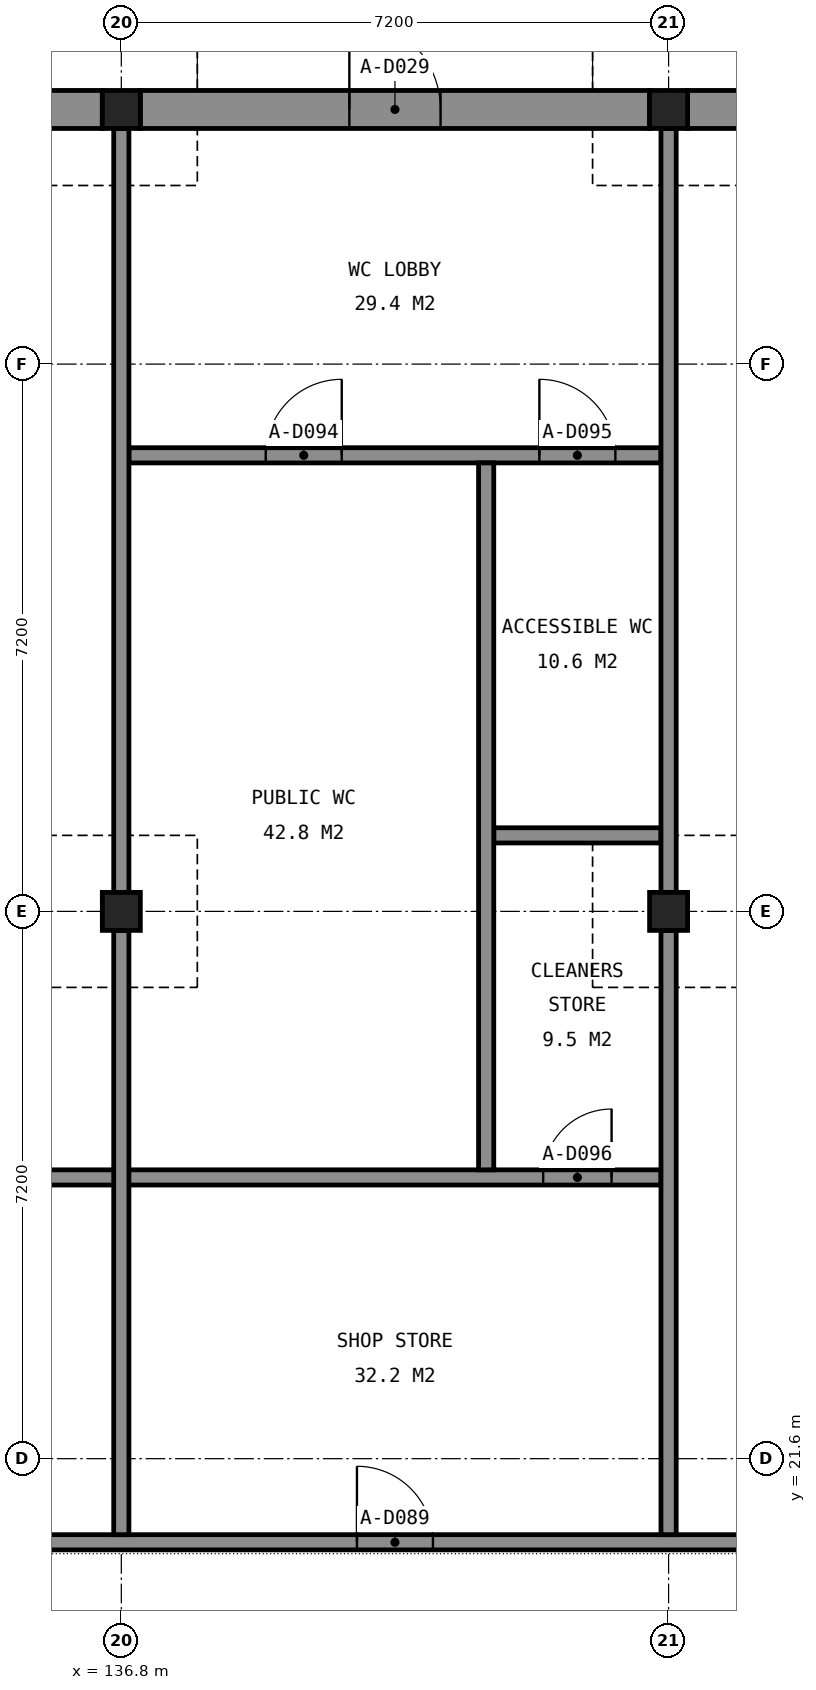
"""IFC4 building model, lengths in metres.
Left out: names, types, materials, properties, quantities, classifications, styles, units other than length and angle.
Written with IfcOpenShell. Run it as: python <this file> out.ifc"""

import sys

from ifc_helpers import new_model, si_unit, direction, frame, frame_2d, origin, origin_2d, place, context, subcontext, project, spatial, rectangle, extrude, element, fill, save


model = new_model("IFC4")
c1 = context("Model", 3, precision=1e-05, world=origin(), true_north=direction((0.0, 1.0)))
c2 = subcontext(c1, "Body", "Model", "MODEL_VIEW")
j1 = project(units=[si_unit("LENGTHUNIT", "METRE"), si_unit("PLANEANGLEUNIT", "RADIAN")], contexts=[c1])
p1 = place(None, origin())
s1 = spatial("IfcSite", under=j1, at=p1, CompositionType="ELEMENT")
p2 = place(p1, origin())
s2 = spatial("IfcBuilding", under=s1, at=p2, CompositionType="ELEMENT")
p3 = place(p2, origin())
s3 = spatial("IfcBuildingStorey", under=s2, at=p3, CompositionType="ELEMENT", Elevation=0.0)
for number, where, z_axis, x_axis in (
    (1, (136.8, 39.35, 0.0), (0.0, 0.0, 1.0), (1.0, 0.0, 0.0)),
    (2, (144.0, 39.35, 0.0), (0.0, 0.0, 1.0), (1.0, 0.0, 0.0)),
    (3, (136.8, 28.8, 0.0), (0.0, 0.0, 1.0), (1.0, 0.0, 0.0)),
    (4, (144.0, 28.8, 0.0), (0.0, 0.0, 1.0), (1.0, 0.0, 0.0)),
):
    element("IfcColumn", number, at=place(p3, frame(where, z_axis=z_axis, x_axis=x_axis)), inside=s3, PredefinedType="COLUMN", context=c2, shape_type="SweptSolid", body=[
        extrude(rectangle(XDim=0.5, YDim=0.5, at=origin_2d()), origin(), (0.0, 0.0, 1.0), 3.7),
    ])
p4 = place(p3, frame((129.85, 39.35, 0.0), z_axis=(0.0, 0.0, 1.0), x_axis=(1.0, 0.0, 0.0)))
e5 = element("IfcWall", 5, at=p4, inside=s3, PredefinedType="SOLIDWALL", context=c2, shape_type="SweptSolid", body=[
    extrude(rectangle(XDim=6.7, YDim=0.5, at=frame_2d((3.35, 0.0))), origin(), (0.0, 0.0, 1.0), 3.6),
])
p5 = place(p4, frame((0.45, 0.0, 0.0)))
e6 = element("IfcOpeningElement", 6, at=p5, cuts=e5, PredefinedType="OPENING", context=c2, shape_type="SweptSolid", body=[
    extrude(rectangle(XDim=1.8, YDim=2.4, at=frame_2d((0.9, 1.2))), frame((0.0, 0.26, 0.0), z_axis=(0.0, -1.0, 0.0), x_axis=(1.0, 0.0, 0.0)), (0.0, 0.0, 1.0), 0.52),
])
p6 = place(p4, frame((2.6, 0.0, 0.6)))
e7 = element("IfcOpeningElement", 7, at=p6, cuts=e5, PredefinedType="OPENING", context=c2, shape_type="SweptSolid", body=[
    extrude(rectangle(XDim=3.0, YDim=2.4, at=frame_2d((1.5, 1.2))), frame((0.0, 0.26, 0.0), z_axis=(0.0, -1.0, 0.0), x_axis=(1.0, 0.0, 0.0)), (0.0, 0.0, 1.0), 0.52),
])
p7 = place(p3, frame((137.05, 39.35, 0.0), z_axis=(0.0, 0.0, 1.0), x_axis=(1.0, 0.0, 0.0)))
e8 = element("IfcWall", 8, at=p7, inside=s3, PredefinedType="SOLIDWALL", context=c2, shape_type="SweptSolid", body=[
    extrude(rectangle(XDim=6.7, YDim=0.5, at=frame_2d((3.35, 0.0))), origin(), (0.0, 0.0, 1.0), 3.6),
])
p8 = place(p7, frame((2.75, 0.0, 0.0)))
e9 = element("IfcOpeningElement", 9, at=p8, cuts=e8, PredefinedType="OPENING", context=c2, shape_type="SweptSolid", body=[
    extrude(rectangle(XDim=1.2, YDim=2.1, at=frame_2d((0.6, 1.05))), frame((0.0, 0.26, 0.0), z_axis=(0.0, -1.0, 0.0), x_axis=(1.0, 0.0, 0.0)), (0.0, 0.0, 1.0), 0.52),
])
p9 = place(p3, frame((144.25, 39.35, 0.0), z_axis=(0.0, 0.0, 1.0), x_axis=(1.0, 0.0, 0.0)))
e10 = element("IfcWall", 10, at=p9, inside=s3, PredefinedType="SOLIDWALL", context=c2, shape_type="SweptSolid", body=[
    extrude(rectangle(XDim=6.45, YDim=0.5, at=frame_2d((3.225, 0.0))), origin(), (0.0, 0.0, 1.0), 3.6),
])
p10 = place(p9, frame((4.45, 0.0, 0.0)))
e11 = element("IfcOpeningElement", 11, at=p10, cuts=e10, PredefinedType="OPENING", context=c2, shape_type="SweptSolid", body=[
    extrude(rectangle(XDim=1.2, YDim=2.1, at=frame_2d((0.6, 1.05))), frame((0.0, 0.26, 0.0), z_axis=(0.0, -1.0, 0.0), x_axis=(1.0, 0.0, 0.0)), (0.0, 0.0, 1.0), 0.52),
])
p11 = place(p3, frame((54.35, 20.5, 0.0), z_axis=(0.0, 0.0, 1.0), x_axis=(1.0, 0.0, 0.0)))
e12 = element("IfcWall", 12, at=p11, inside=s3, PredefinedType="PARTITIONING", context=c2, shape_type="SweptSolid", body=[
    extrude(rectangle(XDim=92.9, YDim=0.2, at=frame_2d((46.45, 0.0))), origin(), (0.0, 0.0, 1.0), 3.5),
])
p12 = place(p11, frame((1.1, 0.0, 0.0)))
e13 = element("IfcOpeningElement", 13, at=p12, cuts=e12, PredefinedType="OPENING", context=c2, shape_type="SweptSolid", body=[
    extrude(rectangle(XDim=0.9, YDim=2.1, at=frame_2d((0.45, 1.05))), frame((0.0, 0.11, 0.0), z_axis=(0.0, -1.0, 0.0), x_axis=(1.0, 0.0, 0.0)), (0.0, 0.0, 1.0), 0.22),
])
p13 = place(p11, frame((90.9, 0.0, 0.0)))
e14 = element("IfcOpeningElement", 14, at=p13, cuts=e12, PredefinedType="OPENING", context=c2, shape_type="SweptSolid", body=[
    extrude(rectangle(XDim=0.9, YDim=2.1, at=frame_2d((0.45, 1.05))), frame((0.0, 0.11, 0.0), z_axis=(0.0, -1.0, 0.0), x_axis=(1.0, 0.0, 0.0)), (0.0, 0.0, 1.0), 0.22),
])
p14 = place(p11, frame((6.35, 0.0, 0.0)))
e15 = element("IfcOpeningElement", 15, at=p14, cuts=e12, PredefinedType="OPENING", context=c2, shape_type="SweptSolid", body=[
    extrude(rectangle(XDim=1.0, YDim=2.1, at=frame_2d((0.5, 1.05))), frame((0.0, 0.11, 0.0), z_axis=(0.0, -1.0, 0.0), x_axis=(1.0, 0.0, 0.0)), (0.0, 0.0, 1.0), 0.22),
])
p15 = place(p11, frame((13.55, 0.0, 0.0)))
e16 = element("IfcOpeningElement", 16, at=p15, cuts=e12, PredefinedType="OPENING", context=c2, shape_type="SweptSolid", body=[
    extrude(rectangle(XDim=1.0, YDim=2.1, at=frame_2d((0.5, 1.05))), frame((0.0, 0.11, 0.0), z_axis=(0.0, -1.0, 0.0), x_axis=(1.0, 0.0, 0.0)), (0.0, 0.0, 1.0), 0.22),
])
p16 = place(p11, frame((20.75, 0.0, 0.0)))
e17 = element("IfcOpeningElement", 17, at=p16, cuts=e12, PredefinedType="OPENING", context=c2, shape_type="SweptSolid", body=[
    extrude(rectangle(XDim=1.0, YDim=2.1, at=frame_2d((0.5, 1.05))), frame((0.0, 0.11, 0.0), z_axis=(0.0, -1.0, 0.0), x_axis=(1.0, 0.0, 0.0)), (0.0, 0.0, 1.0), 0.22),
])
p17 = place(p11, frame((27.95, 0.0, 0.0)))
e18 = element("IfcOpeningElement", 18, at=p17, cuts=e12, PredefinedType="OPENING", context=c2, shape_type="SweptSolid", body=[
    extrude(rectangle(XDim=1.0, YDim=2.1, at=frame_2d((0.5, 1.05))), frame((0.0, 0.11, 0.0), z_axis=(0.0, -1.0, 0.0), x_axis=(1.0, 0.0, 0.0)), (0.0, 0.0, 1.0), 0.22),
])
p18 = place(p11, frame((35.15, 0.0, 0.0)))
e19 = element("IfcOpeningElement", 19, at=p18, cuts=e12, PredefinedType="OPENING", context=c2, shape_type="SweptSolid", body=[
    extrude(rectangle(XDim=1.0, YDim=2.1, at=frame_2d((0.5, 1.05))), frame((0.0, 0.11, 0.0), z_axis=(0.0, -1.0, 0.0), x_axis=(1.0, 0.0, 0.0)), (0.0, 0.0, 1.0), 0.22),
])
p19 = place(p11, frame((42.35, 0.0, 0.0)))
e20 = element("IfcOpeningElement", 20, at=p19, cuts=e12, PredefinedType="OPENING", context=c2, shape_type="SweptSolid", body=[
    extrude(rectangle(XDim=1.0, YDim=2.1, at=frame_2d((0.5, 1.05))), frame((0.0, 0.11, 0.0), z_axis=(0.0, -1.0, 0.0), x_axis=(1.0, 0.0, 0.0)), (0.0, 0.0, 1.0), 0.22),
])
p20 = place(p11, frame((49.55, 0.0, 0.0)))
e21 = element("IfcOpeningElement", 21, at=p20, cuts=e12, PredefinedType="OPENING", context=c2, shape_type="SweptSolid", body=[
    extrude(rectangle(XDim=1.0, YDim=2.1, at=frame_2d((0.5, 1.05))), frame((0.0, 0.11, 0.0), z_axis=(0.0, -1.0, 0.0), x_axis=(1.0, 0.0, 0.0)), (0.0, 0.0, 1.0), 0.22),
])
p21 = place(p11, frame((56.75, 0.0, 0.0)))
e22 = element("IfcOpeningElement", 22, at=p21, cuts=e12, PredefinedType="OPENING", context=c2, shape_type="SweptSolid", body=[
    extrude(rectangle(XDim=1.0, YDim=2.1, at=frame_2d((0.5, 1.05))), frame((0.0, 0.11, 0.0), z_axis=(0.0, -1.0, 0.0), x_axis=(1.0, 0.0, 0.0)), (0.0, 0.0, 1.0), 0.22),
])
p22 = place(p11, frame((63.95, 0.0, 0.0)))
e23 = element("IfcOpeningElement", 23, at=p22, cuts=e12, PredefinedType="OPENING", context=c2, shape_type="SweptSolid", body=[
    extrude(rectangle(XDim=1.0, YDim=2.1, at=frame_2d((0.5, 1.05))), frame((0.0, 0.11, 0.0), z_axis=(0.0, -1.0, 0.0), x_axis=(1.0, 0.0, 0.0)), (0.0, 0.0, 1.0), 0.22),
])
p23 = place(p11, frame((71.15, 0.0, 0.0)))
e24 = element("IfcOpeningElement", 24, at=p23, cuts=e12, PredefinedType="OPENING", context=c2, shape_type="SweptSolid", body=[
    extrude(rectangle(XDim=1.0, YDim=2.1, at=frame_2d((0.5, 1.05))), frame((0.0, 0.11, 0.0), z_axis=(0.0, -1.0, 0.0), x_axis=(1.0, 0.0, 0.0)), (0.0, 0.0, 1.0), 0.22),
])
p24 = place(p11, frame((78.35, 0.0, 0.0)))
e25 = element("IfcOpeningElement", 25, at=p24, cuts=e12, PredefinedType="OPENING", context=c2, shape_type="SweptSolid", body=[
    extrude(rectangle(XDim=1.0, YDim=2.1, at=frame_2d((0.5, 1.05))), frame((0.0, 0.11, 0.0), z_axis=(0.0, -1.0, 0.0), x_axis=(1.0, 0.0, 0.0)), (0.0, 0.0, 1.0), 0.22),
])
p25 = place(p11, frame((85.55, 0.0, 0.0)))
e26 = element("IfcOpeningElement", 26, at=p25, cuts=e12, PredefinedType="OPENING", context=c2, shape_type="SweptSolid", body=[
    extrude(rectangle(XDim=1.0, YDim=2.1, at=frame_2d((0.5, 1.05))), frame((0.0, 0.11, 0.0), z_axis=(0.0, -1.0, 0.0), x_axis=(1.0, 0.0, 0.0)), (0.0, 0.0, 1.0), 0.22),
])
p26 = place(p3, frame((57.7, 25.3, 0.0), z_axis=(0.0, 0.0, 1.0), x_axis=(1.0, 0.0, 0.0)))
e27 = element("IfcWall", 27, at=p26, inside=s3, PredefinedType="PARTITIONING", context=c2, shape_type="SweptSolid", body=[
    extrude(rectangle(XDim=86.2, YDim=0.2, at=frame_2d((43.1, 0.0))), origin(), (0.0, 0.0, 1.0), 3.5),
])
p27 = place(p26, frame((3.0, 0.0, 0.0)))
e28 = element("IfcOpeningElement", 28, at=p27, cuts=e27, PredefinedType="OPENING", context=c2, shape_type="SweptSolid", body=[
    extrude(rectangle(XDim=1.0, YDim=2.1, at=frame_2d((0.5, 1.05))), frame((0.0, 0.11, 0.0), z_axis=(0.0, -1.0, 0.0), x_axis=(1.0, 0.0, 0.0)), (0.0, 0.0, 1.0), 0.22),
])
p28 = place(p26, frame((10.2, 0.0, 0.0)))
e29 = element("IfcOpeningElement", 29, at=p28, cuts=e27, PredefinedType="OPENING", context=c2, shape_type="SweptSolid", body=[
    extrude(rectangle(XDim=1.0, YDim=2.1, at=frame_2d((0.5, 1.05))), frame((0.0, 0.11, 0.0), z_axis=(0.0, -1.0, 0.0), x_axis=(1.0, 0.0, 0.0)), (0.0, 0.0, 1.0), 0.22),
])
p29 = place(p26, frame((17.4, 0.0, 0.0)))
e30 = element("IfcOpeningElement", 30, at=p29, cuts=e27, PredefinedType="OPENING", context=c2, shape_type="SweptSolid", body=[
    extrude(rectangle(XDim=1.0, YDim=2.1, at=frame_2d((0.5, 1.05))), frame((0.0, 0.11, 0.0), z_axis=(0.0, -1.0, 0.0), x_axis=(1.0, 0.0, 0.0)), (0.0, 0.0, 1.0), 0.22),
])
p30 = place(p26, frame((24.6, 0.0, 0.0)))
e31 = element("IfcOpeningElement", 31, at=p30, cuts=e27, PredefinedType="OPENING", context=c2, shape_type="SweptSolid", body=[
    extrude(rectangle(XDim=1.0, YDim=2.1, at=frame_2d((0.5, 1.05))), frame((0.0, 0.11, 0.0), z_axis=(0.0, -1.0, 0.0), x_axis=(1.0, 0.0, 0.0)), (0.0, 0.0, 1.0), 0.22),
])
p31 = place(p26, frame((31.8, 0.0, 0.0)))
e32 = element("IfcOpeningElement", 32, at=p31, cuts=e27, PredefinedType="OPENING", context=c2, shape_type="SweptSolid", body=[
    extrude(rectangle(XDim=1.0, YDim=2.1, at=frame_2d((0.5, 1.05))), frame((0.0, 0.11, 0.0), z_axis=(0.0, -1.0, 0.0), x_axis=(1.0, 0.0, 0.0)), (0.0, 0.0, 1.0), 0.22),
])
p32 = place(p26, frame((39.0, 0.0, 0.0)))
e33 = element("IfcOpeningElement", 33, at=p32, cuts=e27, PredefinedType="OPENING", context=c2, shape_type="SweptSolid", body=[
    extrude(rectangle(XDim=1.0, YDim=2.1, at=frame_2d((0.5, 1.05))), frame((0.0, 0.11, 0.0), z_axis=(0.0, -1.0, 0.0), x_axis=(1.0, 0.0, 0.0)), (0.0, 0.0, 1.0), 0.22),
])
p33 = place(p26, frame((46.2, 0.0, 0.0)))
e34 = element("IfcOpeningElement", 34, at=p33, cuts=e27, PredefinedType="OPENING", context=c2, shape_type="SweptSolid", body=[
    extrude(rectangle(XDim=1.0, YDim=2.1, at=frame_2d((0.5, 1.05))), frame((0.0, 0.11, 0.0), z_axis=(0.0, -1.0, 0.0), x_axis=(1.0, 0.0, 0.0)), (0.0, 0.0, 1.0), 0.22),
])
p34 = place(p26, frame((53.4, 0.0, 0.0)))
e35 = element("IfcOpeningElement", 35, at=p34, cuts=e27, PredefinedType="OPENING", context=c2, shape_type="SweptSolid", body=[
    extrude(rectangle(XDim=1.0, YDim=2.1, at=frame_2d((0.5, 1.05))), frame((0.0, 0.11, 0.0), z_axis=(0.0, -1.0, 0.0), x_axis=(1.0, 0.0, 0.0)), (0.0, 0.0, 1.0), 0.22),
])
p35 = place(p26, frame((60.6, 0.0, 0.0)))
e36 = element("IfcOpeningElement", 36, at=p35, cuts=e27, PredefinedType="OPENING", context=c2, shape_type="SweptSolid", body=[
    extrude(rectangle(XDim=1.0, YDim=2.1, at=frame_2d((0.5, 1.05))), frame((0.0, 0.11, 0.0), z_axis=(0.0, -1.0, 0.0), x_axis=(1.0, 0.0, 0.0)), (0.0, 0.0, 1.0), 0.22),
])
p36 = place(p26, frame((67.8, 0.0, 0.0)))
e37 = element("IfcOpeningElement", 37, at=p36, cuts=e27, PredefinedType="OPENING", context=c2, shape_type="SweptSolid", body=[
    extrude(rectangle(XDim=1.0, YDim=2.1, at=frame_2d((0.5, 1.05))), frame((0.0, 0.11, 0.0), z_axis=(0.0, -1.0, 0.0), x_axis=(1.0, 0.0, 0.0)), (0.0, 0.0, 1.0), 0.22),
])
p37 = place(p26, frame((75.0, 0.0, 0.0)))
e38 = element("IfcOpeningElement", 38, at=p37, cuts=e27, PredefinedType="OPENING", context=c2, shape_type="SweptSolid", body=[
    extrude(rectangle(XDim=1.0, YDim=2.1, at=frame_2d((0.5, 1.05))), frame((0.0, 0.11, 0.0), z_axis=(0.0, -1.0, 0.0), x_axis=(1.0, 0.0, 0.0)), (0.0, 0.0, 1.0), 0.22),
])
p38 = place(p26, frame((84.65, 0.0, 0.0)))
e39 = element("IfcOpeningElement", 39, at=p38, cuts=e27, PredefinedType="OPENING", context=c2, shape_type="SweptSolid", body=[
    extrude(rectangle(XDim=0.9, YDim=2.1, at=frame_2d((0.45, 1.05))), frame((0.0, 0.11, 0.0), z_axis=(0.0, -1.0, 0.0), x_axis=(1.0, 0.0, 0.0)), (0.0, 0.0, 1.0), 0.22),
])
p39 = place(p3, frame((141.7, 29.8, 0.0), z_axis=(0.0, 0.0, 1.0), x_axis=(1.0, 0.0, 0.0)))
e40 = element("IfcWall", 40, at=p39, inside=s3, PredefinedType="PARTITIONING", context=c2, shape_type="SweptSolid", body=[
    extrude(rectangle(XDim=2.2, YDim=0.2, at=frame_2d((1.1, 0.0))), origin(), (0.0, 0.0, 1.0), 3.5),
])
p40 = place(p3, frame((136.9, 34.8, 0.0), z_axis=(0.0, 0.0, 1.0), x_axis=(1.0, 0.0, 0.0)))
e41 = element("IfcWall", 41, at=p40, inside=s3, PredefinedType="PARTITIONING", context=c2, shape_type="SweptSolid", body=[
    extrude(rectangle(XDim=7.0, YDim=0.2, at=frame_2d((3.5, 0.0))), origin(), (0.0, 0.0, 1.0), 3.5),
])
p41 = place(p40, frame((1.8, 0.0, 0.0)))
e42 = element("IfcOpeningElement", 42, at=p41, cuts=e41, PredefinedType="OPENING", context=c2, shape_type="SweptSolid", body=[
    extrude(rectangle(XDim=1.0, YDim=2.1, at=frame_2d((0.5, 1.05))), frame((0.0, 0.11, 0.0), z_axis=(0.0, -1.0, 0.0), x_axis=(1.0, 0.0, 0.0)), (0.0, 0.0, 1.0), 0.22),
])
p42 = place(p40, frame((5.4, 0.0, 0.0)))
e43 = element("IfcOpeningElement", 43, at=p42, cuts=e41, PredefinedType="OPENING", context=c2, shape_type="SweptSolid", body=[
    extrude(rectangle(XDim=1.0, YDim=2.1, at=frame_2d((0.5, 1.05))), frame((0.0, 0.11, 0.0), z_axis=(0.0, -1.0, 0.0), x_axis=(1.0, 0.0, 0.0)), (0.0, 0.0, 1.0), 0.22),
])
p43 = place(p3, frame((136.8, 20.6, 0.0), z_axis=(0.0, 0.0, 1.0), x_axis=(0.0, 1.0, 0.0)))
e44 = element("IfcWall", 44, at=p43, inside=s3, PredefinedType="PARTITIONING", context=c2, shape_type="SweptSolid", body=[
    extrude(rectangle(XDim=7.95, YDim=0.2, at=frame_2d((3.975, 0.0))), origin(), (0.0, 0.0, 1.0), 3.5),
])
p44 = place(p3, frame((136.8, 29.05, 0.0), z_axis=(0.0, 0.0, 1.0), x_axis=(0.0, 1.0, 0.0)))
e45 = element("IfcWall", 45, at=p44, inside=s3, PredefinedType="PARTITIONING", context=c2, shape_type="SweptSolid", body=[
    extrude(rectangle(XDim=10.05, YDim=0.2, at=frame_2d((5.025, 0.0))), origin(), (0.0, 0.0, 1.0), 3.5),
])
p45 = place(p3, frame((141.6, 25.4, 0.0), z_axis=(0.0, 0.0, 1.0), x_axis=(0.0, 1.0, 0.0)))
e46 = element("IfcWall", 46, at=p45, inside=s3, PredefinedType="PARTITIONING", context=c2, shape_type="SweptSolid", body=[
    extrude(rectangle(XDim=9.3, YDim=0.2, at=frame_2d((4.65, 0.0))), origin(), (0.0, 0.0, 1.0), 3.5),
])
p46 = place(p3, frame((144.0, 20.6, 0.0), z_axis=(0.0, 0.0, 1.0), x_axis=(0.0, 1.0, 0.0)))
e47 = element("IfcWall", 47, at=p46, inside=s3, PredefinedType="PARTITIONING", context=c2, shape_type="SweptSolid", body=[
    extrude(rectangle(XDim=7.95, YDim=0.2, at=frame_2d((3.975, 0.0))), origin(), (0.0, 0.0, 1.0), 3.5),
])
p47 = place(p3, frame((144.0, 29.05, 0.0), z_axis=(0.0, 0.0, 1.0), x_axis=(0.0, 1.0, 0.0)))
e48 = element("IfcWall", 48, at=p47, inside=s3, PredefinedType="PARTITIONING", context=c2, shape_type="SweptSolid", body=[
    extrude(rectangle(XDim=10.05, YDim=0.2, at=frame_2d((5.025, 0.0))), origin(), (0.0, 0.0, 1.0), 3.5),
])
p48 = place(p8, origin())
e49 = element("IfcDoor", 49, at=p48, inside=s3, OperationType="SINGLE_SWING_LEFT", PredefinedType="DOOR", context=c2, shape_type="SweptSolid", body=[
    extrude(rectangle(XDim=1.2, YDim=2.1, at=frame_2d((0.6, 1.05))), frame((0.0, 0.025, 0.0), z_axis=(0.0, -1.0, 0.0), x_axis=(1.0, 0.0, 0.0)), (0.0, 0.0, 1.0), 0.05),
])
fill(e9, e49)
p49 = place(p25, origin())
e50 = element("IfcDoor", 50, at=p49, inside=s3, OperationType="SINGLE_SWING_LEFT", PredefinedType="DOOR", context=c2, shape_type="SweptSolid", body=[
    extrude(rectangle(XDim=1.0, YDim=2.1, at=frame_2d((0.5, 1.05))), frame((0.0, 0.025, 0.0), z_axis=(0.0, -1.0, 0.0), x_axis=(1.0, 0.0, 0.0)), (0.0, 0.0, 1.0), 0.05),
])
fill(e26, e50)
p50 = place(p41, origin())
e51 = element("IfcDoor", 51, at=p50, inside=s3, OperationType="SINGLE_SWING_RIGHT", PredefinedType="DOOR", context=c2, shape_type="SweptSolid", body=[
    extrude(rectangle(XDim=1.0, YDim=2.1, at=frame_2d((0.5, 1.05))), frame((0.0, 0.025, 0.0), z_axis=(0.0, -1.0, 0.0), x_axis=(1.0, 0.0, 0.0)), (0.0, 0.0, 1.0), 0.05),
])
fill(e42, e51)
p51 = place(p42, origin())
e52 = element("IfcDoor", 52, at=p51, inside=s3, OperationType="SINGLE_SWING_LEFT", PredefinedType="DOOR", context=c2, shape_type="SweptSolid", body=[
    extrude(rectangle(XDim=1.0, YDim=2.1, at=frame_2d((0.5, 1.05))), frame((0.0, 0.025, 0.0), z_axis=(0.0, -1.0, 0.0), x_axis=(1.0, 0.0, 0.0)), (0.0, 0.0, 1.0), 0.05),
])
fill(e43, e52)
p52 = place(p38, origin())
e53 = element("IfcDoor", 53, at=p52, inside=s3, OperationType="SINGLE_SWING_RIGHT", PredefinedType="DOOR", context=c2, shape_type="SweptSolid", body=[
    extrude(rectangle(XDim=0.9, YDim=2.1, at=frame_2d((0.45, 1.05))), frame((0.0, 0.025, 0.0), z_axis=(0.0, -1.0, 0.0), x_axis=(1.0, 0.0, 0.0)), (0.0, 0.0, 1.0), 0.05),
])
fill(e39, e53)
save(model, sys.argv[1])
